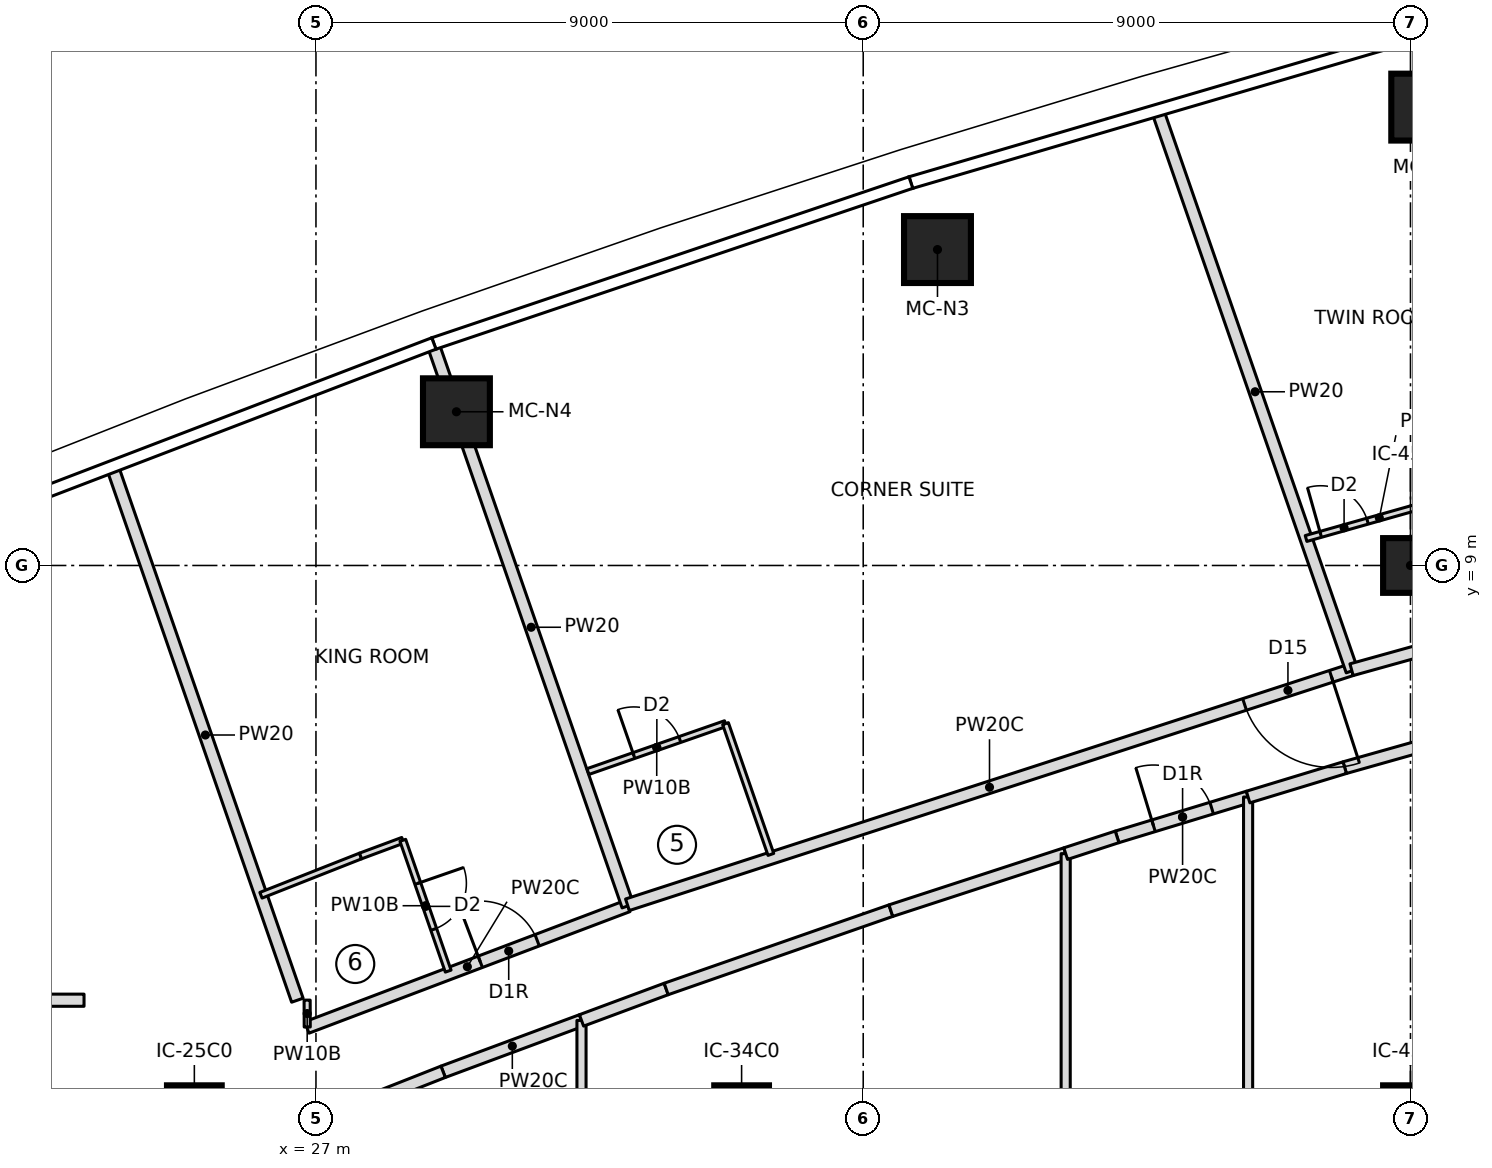
"""IFC4 building model, lengths in metres.
Left out: names, types, materials, properties, quantities, classifications, styles, units other than length and angle.
Written with IfcOpenShell. Run it as: python <this file> out.ifc"""

import sys

from ifc_helpers import new_model, si_unit, direction, frame, frame_2d, origin, origin_2d, place, context, subcontext, project, spatial, rectangle, extrude, element, fill, save


model = new_model("IFC4")
c1 = context("Model", 3, precision=1e-05, world=origin(), true_north=direction((0.0, 1.0)))
c2 = subcontext(c1, "Body", "Model", "MODEL_VIEW")
j1 = project(units=[si_unit("LENGTHUNIT", "METRE"), si_unit("PLANEANGLEUNIT", "RADIAN")], contexts=[c1])
p1 = place(None, origin())
s1 = spatial("IfcSite", under=j1, at=p1, CompositionType="ELEMENT")
p2 = place(p1, origin())
s2 = spatial("IfcBuilding", under=s1, at=p2, CompositionType="ELEMENT")
p3 = place(p2, frame((0.0, 0.0, 267.9)))
s3 = spatial("IfcBuildingStorey", under=s2, at=p3, CompositionType="ELEMENT", Elevation=267.9)
for number, where, z_axis, x_axis in (
    (1, (45.235, 16.539, 0.0), (0.0, 0.0, 1.0), (1.0, 0.0, 0.0)),
    (2, (37.221, 14.196, 0.0), (0.0, 0.0, 1.0), (1.0, 0.0, 0.0)),
    (3, (29.31, 11.528, 0.0), (0.0, 0.0, 1.0), (1.0, 0.0, 0.0)),
):
    element("IfcColumn", number, at=place(p3, frame(where, z_axis=z_axis, x_axis=x_axis)), inside=s3, PredefinedType="COLUMN", context=c2, shape_type="SweptSolid", body=[
        extrude(rectangle(XDim=1.1, YDim=1.1, at=origin_2d()), origin(), (0.0, 0.0, 1.0), 3.55),
    ])
for number, where, z_axis, x_axis in (
    (4, (25.0, 0.0, 0.0), (0.0, 0.0, 1.0), (1.0, 0.0, 0.0)),
    (5, (34.0, 0.0, 0.0), (0.0, 0.0, 1.0), (1.0, 0.0, 0.0)),
    (6, (45.0, 0.0, 0.0), (0.0, 0.0, 1.0), (1.0, 0.0, 0.0)),
    (7, (45.0, 9.0, 0.0), (0.0, 0.0, 1.0), (1.0, 0.0, 0.0)),
):
    element("IfcColumn", number, at=place(p3, frame(where, z_axis=z_axis, x_axis=x_axis)), inside=s3, PredefinedType="COLUMN", context=c2, shape_type="SweptSolid", body=[
        extrude(rectangle(XDim=0.9, YDim=0.9, at=origin_2d()), origin(), (0.0, 0.0, 1.0), 3.55),
    ])
p4 = place(p3, frame((7.287, 1.85, 0.0), z_axis=(0.0, 0.0, 1.0), x_axis=(1.0, 0.0, 0.0)))
e8 = element("IfcWall", 8, at=p4, inside=s3, PredefinedType="PARTITIONING", context=c2, shape_type="SweptSolid", body=[
    extrude(rectangle(XDim=15.899, YDim=0.2, at=frame_2d((7.949, 0.0))), origin(), (0.0, 0.0, 1.0), 3.25),
])
p5 = place(p4, frame((7.624, 0.0, 0.0)))
e9 = element("IfcOpeningElement", 9, at=p5, cuts=e8, PredefinedType="OPENING", context=c2, shape_type="SweptSolid", body=[
    extrude(rectangle(XDim=1.0, YDim=2.1, at=frame_2d((0.5, 1.05))), frame((0.0, 0.11, 0.0), z_axis=(0.0, -1.0, 0.0), x_axis=(1.0, 0.0, 0.0)), (0.0, 0.0, 1.0), 0.22),
])
p6 = place(p3, frame((26.694, 1.85, 0.0), z_axis=(0.0, 0.0, 1.0), x_axis=(-0.327714422317, 0.944776829418, 0.0)))
e10 = element("IfcWall", 10, at=p6, inside=s3, PredefinedType="PARTITIONING", context=c2, shape_type="SweptSolid", body=[
    extrude(rectangle(XDim=9.233, YDim=0.2, at=frame_2d((4.617, 0.0))), origin(), (0.0, 0.0, 1.0), 3.25),
])
p7 = place(p3, frame((26.85, 1.401, 0.0), z_axis=(0.0, 0.0, 1.0), x_axis=(0.935181367748, 0.354169181912, 0.0)))
e11 = element("IfcWall", 11, at=p7, inside=s3, PredefinedType="PARTITIONING", context=c2, shape_type="SweptSolid", body=[
    extrude(rectangle(XDim=5.645, YDim=0.2, at=frame_2d((2.823, 0.0))), origin(), (0.0, 0.0, 1.0), 3.25),
])
p8 = place(p7, frame((3.05, 0.0, 0.0)))
e12 = element("IfcOpeningElement", 12, at=p8, cuts=e11, PredefinedType="OPENING", context=c2, shape_type="SweptSolid", body=[
    extrude(rectangle(XDim=1.0, YDim=2.1, at=frame_2d((0.5, 1.05))), frame((0.0, 0.11, 0.0), z_axis=(0.0, -1.0, 0.0), x_axis=(1.0, 0.0, 0.0)), (0.0, 0.0, 1.0), 0.22),
])
p9 = place(p3, frame((26.096, 3.576, 0.0), z_axis=(0.0, 0.0, 1.0), x_axis=(0.930254925629, 0.366913850028, 0.0)))
e13 = element("IfcWall", 13, at=p9, inside=s3, PredefinedType="PARTITIONING", context=c2, shape_type="SweptSolid", body=[
    extrude(rectangle(XDim=1.76, YDim=0.1, at=frame_2d((0.88, 0.0))), origin(), (0.0, 0.0, 1.0), 3.25),
])
p10 = place(p3, frame((27.733, 4.222, 0.0), z_axis=(0.0, 0.0, 1.0), x_axis=(0.937514267289, 0.347946833049, 0.0)))
e14 = element("IfcWall", 14, at=p10, inside=s3, PredefinedType="PARTITIONING", context=c2, shape_type="SweptSolid", body=[
    extrude(rectangle(XDim=0.742, YDim=0.1, at=frame_2d((0.371, 0.0))), origin(), (0.0, 0.0, 1.0), 3.25),
])
p11 = place(p3, frame((28.428, 4.48, 0.0), z_axis=(0.0, 0.0, 1.0), x_axis=(0.327718024288, -0.944775579996, 0.0)))
e15 = element("IfcWall", 15, at=p11, inside=s3, PredefinedType="PARTITIONING", context=c2, shape_type="SweptSolid", body=[
    extrude(rectangle(XDim=2.277, YDim=0.1, at=frame_2d((1.139, 0.0))), origin(), (0.0, 0.0, 1.0), 3.25),
])
p12 = place(p11, frame((0.75, 0.0, 0.0)))
e16 = element("IfcOpeningElement", 16, at=p12, cuts=e15, PredefinedType="OPENING", context=c2, shape_type="SweptSolid", body=[
    extrude(rectangle(XDim=0.8, YDim=2.1, at=frame_2d((0.4, 1.05))), frame((0.0, 0.06, 0.0), z_axis=(0.0, -1.0, 0.0), x_axis=(1.0, 0.0, 0.0)), (0.0, 0.0, 1.0), 0.12),
])
p13 = place(p3, frame((32.129, 3.401, 0.0), z_axis=(0.0, 0.0, 1.0), x_axis=(-0.327724115377, 0.944773467134, 0.0)))
e17 = element("IfcWall", 17, at=p13, inside=s3, PredefinedType="PARTITIONING", context=c2, shape_type="SweptSolid", body=[
    extrude(rectangle(XDim=9.702, YDim=0.2, at=frame_2d((4.851, 0.0))), origin(), (0.0, 0.0, 1.0), 3.25),
])
p14 = place(p3, frame((44.031, 7.286, 0.0), z_axis=(0.0, 0.0, 1.0), x_axis=(-0.951130603276, -0.308788885019, 0.0)))
e18 = element("IfcWall", 18, at=p14, inside=s3, PredefinedType="PARTITIONING", context=c2, shape_type="SweptSolid", body=[
    extrude(rectangle(XDim=12.521, YDim=0.2, at=frame_2d((6.26, 0.0))), origin(), (0.0, 0.0, 1.0), 3.25),
])
p15 = place(p14, frame((0.35, 0.0, 0.0)))
e19 = element("IfcOpeningElement", 19, at=p15, cuts=e18, PredefinedType="OPENING", context=c2, shape_type="SweptSolid", body=[
    extrude(rectangle(XDim=1.5, YDim=2.1, at=frame_2d((0.75, 1.05))), frame((0.0, 0.11, 0.0), z_axis=(0.0, -1.0, 0.0), x_axis=(1.0, 0.0, 0.0)), (0.0, 0.0, 1.0), 0.22),
])
p16 = place(p3, frame((31.473, 5.611, 0.0), z_axis=(0.0, 0.0, 1.0), x_axis=(0.944305532659, 0.329069994059, 0.0)))
e20 = element("IfcWall", 20, at=p16, inside=s3, PredefinedType="PARTITIONING", context=c2, shape_type="SweptSolid", body=[
    extrude(rectangle(XDim=2.396, YDim=0.1, at=frame_2d((1.198, 0.0))), origin(), (0.0, 0.0, 1.0), 3.25),
])
p17 = place(p16, frame((0.8, 0.0, 0.0)))
e21 = element("IfcOpeningElement", 21, at=p17, cuts=e20, PredefinedType="OPENING", context=c2, shape_type="SweptSolid", body=[
    extrude(rectangle(XDim=0.8, YDim=2.1, at=frame_2d((0.4, 1.05))), frame((0.0, 0.06, 0.0), z_axis=(0.0, -1.0, 0.0), x_axis=(1.0, 0.0, 0.0)), (0.0, 0.0, 1.0), 0.12),
])
p18 = place(p3, frame((33.735, 6.399, 0.0), z_axis=(0.0, 0.0, 1.0), x_axis=(0.32768871219, -0.944785747089, 0.0)))
e22 = element("IfcWall", 22, at=p18, inside=s3, PredefinedType="PARTITIONING", context=c2, shape_type="SweptSolid", body=[
    extrude(rectangle(XDim=2.277, YDim=0.1, at=frame_2d((1.138, 0.0))), origin(), (0.0, 0.0, 1.0), 3.25),
])
p19 = place(p3, frame((44.038, 7.267, 0.0), z_axis=(0.0, 0.0, 1.0), x_axis=(-0.327714576096, 0.944776776077, 0.0)))
e23 = element("IfcWall", 23, at=p19, inside=s3, PredefinedType="PARTITIONING", context=c2, shape_type="SweptSolid", body=[
    extrude(rectangle(XDim=9.717, YDim=0.2, at=frame_2d((4.858, 0.0))), origin(), (0.0, 0.0, 1.0), 3.25),
])
p20 = place(p3, frame((48.056, 8.405, 0.0), z_axis=(0.0, 0.0, 1.0), x_axis=(-0.963429942227, -0.267960344866, 0.0)))
e24 = element("IfcWall", 24, at=p20, inside=s3, PredefinedType="PARTITIONING", context=c2, shape_type="SweptSolid", body=[
    extrude(rectangle(XDim=4.177, YDim=0.2, at=frame_2d((2.089, 0.0))), origin(), (0.0, 0.0, 1.0), 3.25),
])
p21 = place(p20, frame((0.35, 0.0, 0.0)))
e25 = element("IfcOpeningElement", 25, at=p21, cuts=e24, PredefinedType="OPENING", context=c2, shape_type="SweptSolid", body=[
    extrude(rectangle(XDim=1.0, YDim=2.1, at=frame_2d((0.5, 1.05))), frame((0.0, 0.11, 0.0), z_axis=(0.0, -1.0, 0.0), x_axis=(1.0, 0.0, 0.0)), (0.0, 0.0, 1.0), 0.22),
])
p22 = place(p3, frame((43.283, 9.444, 0.0), z_axis=(0.0, 0.0, 1.0), x_axis=(0.962409173596, 0.271603723424, 0.0)))
e26 = element("IfcWall", 26, at=p22, inside=s3, PredefinedType="PARTITIONING", context=c2, shape_type="SweptSolid", body=[
    extrude(rectangle(XDim=2.504, YDim=0.1, at=frame_2d((1.252, 0.0))), origin(), (0.0, 0.0, 1.0), 3.25),
])
p23 = place(p22, frame((0.25, 0.0, 0.0)))
e27 = element("IfcOpeningElement", 27, at=p23, cuts=e26, PredefinedType="OPENING", context=c2, shape_type="SweptSolid", body=[
    extrude(rectangle(XDim=0.8, YDim=2.1, at=frame_2d((0.4, 1.05))), frame((0.0, 0.06, 0.0), z_axis=(0.0, -1.0, 0.0), x_axis=(1.0, 0.0, 0.0)), (0.0, 0.0, 1.0), 0.12),
])
p24 = place(p3, frame((29.092, 0.673, 0.0), z_axis=(0.0, 0.0, 1.0), x_axis=(0.937481542944, 0.348034993411, 0.0)))
e28 = element("IfcWall", 28, at=p24, inside=s3, PredefinedType="PARTITIONING", context=c2, shape_type="SweptSolid", body=[
    extrude(rectangle(XDim=2.427, YDim=0.2, at=frame_2d((1.214, 0.0))), origin(), (0.0, 0.0, 1.0), 3.25),
])
p25 = place(p3, frame((27.385, 0.0, 0.0), z_axis=(0.0, 0.0, 1.0), x_axis=(0.930265251482, 0.366887669302, 0.0)))
e29 = element("IfcWall", 29, at=p25, inside=s3, PredefinedType="PARTITIONING", context=c2, shape_type="SweptSolid", body=[
    extrude(rectangle(XDim=1.834, YDim=0.2, at=frame_2d((0.917, 0.0))), origin(), (0.0, 0.0, 1.0), 3.25),
])
p26 = place(p3, frame((31.367, -1.518, 0.0), z_axis=(0.0, 0.0, 1.0), x_axis=(0.0, 1.0, 0.0)))
e30 = element("IfcWall", 30, at=p26, inside=s3, PredefinedType="PARTITIONING", context=c2, shape_type="SweptSolid", body=[
    extrude(rectangle(XDim=3.035, YDim=0.15, at=frame_2d((1.518, 0.0))), origin(), (0.0, 0.0, 1.0), 3.25),
])
p27 = place(p3, frame((31.367, 1.518, 0.0), z_axis=(0.0, 0.0, 1.0), x_axis=(0.93742527201, 0.348186529604, 0.0)))
e31 = element("IfcWall", 31, at=p27, inside=s3, PredefinedType="PARTITIONING", context=c2, shape_type="SweptSolid", body=[
    extrude(rectangle(XDim=1.486, YDim=0.2, at=frame_2d((0.743, 0.0))), origin(), (0.0, 0.0, 1.0), 3.25),
])
p28 = place(p3, frame((32.76, 2.035, 0.0), z_axis=(0.0, 0.0, 1.0), x_axis=(0.944283635062, 0.329132825093, 0.0)))
e32 = element("IfcWall", 32, at=p28, inside=s3, PredefinedType="PARTITIONING", context=c2, shape_type="SweptSolid", body=[
    extrude(rectangle(XDim=3.913, YDim=0.2, at=frame_2d((1.957, 0.0))), origin(), (0.0, 0.0, 1.0), 3.25),
])
p29 = place(p3, frame((36.455, 3.323, 0.0), z_axis=(0.0, 0.0, 1.0), x_axis=(0.95070604111, 0.310093572003, 0.0)))
e33 = element("IfcWall", 33, at=p29, inside=s3, PredefinedType="PARTITIONING", context=c2, shape_type="SweptSolid", body=[
    extrude(rectangle(XDim=3.024, YDim=0.2, at=frame_2d((1.512, 0.0))), origin(), (0.0, 0.0, 1.0), 3.25),
])
p30 = place(p3, frame((39.33, -4.26, 0.0), z_axis=(0.0, 0.0, 1.0), x_axis=(0.0, 1.0, 0.0)))
e34 = element("IfcWall", 34, at=p30, inside=s3, PredefinedType="PARTITIONING", context=c2, shape_type="SweptSolid", body=[
    extrude(rectangle(XDim=8.521, YDim=0.15, at=frame_2d((4.26, 0.0))), origin(), (0.0, 0.0, 1.0), 3.25),
])
p31 = place(p3, frame((40.175, 4.536, 0.0), z_axis=(0.0, 0.0, 1.0), x_axis=(0.956739496331, 0.290945933396, 0.0)))
e35 = element("IfcWall", 35, at=p31, inside=s3, PredefinedType="PARTITIONING", context=c2, shape_type="SweptSolid", body=[
    extrude(rectangle(XDim=2.252, YDim=0.2, at=frame_2d((1.126, 0.0))), origin(), (0.0, 0.0, 1.0), 3.25),
])
p32 = place(p31, frame((0.626, 0.0, 0.0)))
e36 = element("IfcOpeningElement", 36, at=p32, cuts=e35, PredefinedType="OPENING", context=c2, shape_type="SweptSolid", body=[
    extrude(rectangle(XDim=1.0, YDim=2.1, at=frame_2d((0.5, 1.05))), frame((0.0, 0.11, 0.0), z_axis=(0.0, -1.0, 0.0), x_axis=(1.0, 0.0, 0.0)), (0.0, 0.0, 1.0), 0.22),
])
p33 = place(p3, frame((39.33, 4.26, 0.0), z_axis=(0.0, 0.0, 1.0), x_axis=(0.950722800792, 0.310042184314, 0.0)))
e37 = element("IfcWall", 37, at=p33, inside=s3, PredefinedType="PARTITIONING", context=c2, shape_type="SweptSolid", body=[
    extrude(rectangle(XDim=0.889, YDim=0.2, at=frame_2d((0.444, 0.0))), origin(), (0.0, 0.0, 1.0), 3.25),
])
p34 = place(p3, frame((42.33, -5.191, 0.0), z_axis=(0.0, 0.0, 1.0), x_axis=(0.0, 1.0, 0.0)))
e38 = element("IfcWall", 38, at=p34, inside=s3, PredefinedType="PARTITIONING", context=c2, shape_type="SweptSolid", body=[
    extrude(rectangle(XDim=10.383, YDim=0.15, at=frame_2d((5.191, 0.0))), origin(), (0.0, 0.0, 1.0), 3.25),
])
p35 = place(p3, frame((43.918, 5.675, 0.0), z_axis=(0.0, 0.0, 1.0), x_axis=(0.962411212211, 0.271596499628, 0.0)))
e39 = element("IfcWall", 39, at=p35, inside=s3, PredefinedType="PARTITIONING", context=c2, shape_type="SweptSolid", body=[
    extrude(rectangle(XDim=3.913, YDim=0.2, at=frame_2d((1.957, 0.0))), origin(), (0.0, 0.0, 1.0), 3.25),
])
p36 = place(p35, frame((1.457, 0.0, 0.0)))
e40 = element("IfcOpeningElement", 40, at=p36, cuts=e39, PredefinedType="OPENING", context=c2, shape_type="SweptSolid", body=[
    extrude(rectangle(XDim=1.0, YDim=2.1, at=frame_2d((0.5, 1.05))), frame((0.0, 0.11, 0.0), z_axis=(0.0, -1.0, 0.0), x_axis=(1.0, 0.0, 0.0)), (0.0, 0.0, 1.0), 0.22),
])
p37 = place(p3, frame((42.33, 5.191, 0.0), z_axis=(0.0, 0.0, 1.0), x_axis=(0.956702361065, 0.291068020115, 0.0)))
e41 = element("IfcWall", 41, at=p37, inside=s3, PredefinedType="PARTITIONING", context=c2, shape_type="SweptSolid", body=[
    extrude(rectangle(XDim=1.661, YDim=0.2, at=frame_2d((0.831, 0.0))), origin(), (0.0, 0.0, 1.0), 3.25),
])
p38 = place(p3, frame((26.856, 1.409, 0.0), z_axis=(0.0, 0.0, 1.0), x_axis=(-0.003863105832, 0.999992538179, 0.0)))
e42 = element("IfcWall", 42, at=p38, inside=s3, PredefinedType="PARTITIONING", context=c2, shape_type="SweptSolid", body=[
    extrude(rectangle(XDim=0.442, YDim=0.1, at=frame_2d((0.221, 0.0))), origin(), (0.0, 0.0, 1.0), 3.25),
])
p39 = place(p12, origin())
e43 = element("IfcDoor", 43, at=p39, inside=s3, OperationType="SINGLE_SWING_LEFT", PredefinedType="DOOR", context=c2, shape_type="SweptSolid", body=[
    extrude(rectangle(XDim=0.8, YDim=2.1, at=frame_2d((0.4, 1.05))), frame((0.0, 0.025, 0.0), z_axis=(0.0, -1.0, 0.0), x_axis=(1.0, 0.0, 0.0)), (0.0, 0.0, 1.0), 0.05),
])
fill(e16, e43)
p40 = place(p8, origin())
e44 = element("IfcDoor", 44, at=p40, inside=s3, OperationType="SINGLE_SWING_RIGHT", PredefinedType="DOOR", context=c2, shape_type="SweptSolid", body=[
    extrude(rectangle(XDim=1.0, YDim=2.1, at=frame_2d((0.5, 1.05))), frame((0.0, 0.025, 0.0), z_axis=(0.0, -1.0, 0.0), x_axis=(1.0, 0.0, 0.0)), (0.0, 0.0, 1.0), 0.05),
])
fill(e12, e44)
p41 = place(p17, origin())
e45 = element("IfcDoor", 45, at=p41, inside=s3, OperationType="SINGLE_SWING_LEFT", PredefinedType="DOOR", context=c2, shape_type="SweptSolid", body=[
    extrude(rectangle(XDim=0.8, YDim=2.1, at=frame_2d((0.4, 1.05))), frame((0.0, 0.025, 0.0), z_axis=(0.0, -1.0, 0.0), x_axis=(1.0, 0.0, 0.0)), (0.0, 0.0, 1.0), 0.05),
])
fill(e21, e45)
p42 = place(p15, origin())
e46 = element("IfcDoor", 46, at=p42, inside=s3, OperationType="DOUBLE_DOOR_SINGLE_SWING", PredefinedType="DOOR", context=c2, shape_type="SweptSolid", body=[
    extrude(rectangle(XDim=1.5, YDim=2.1, at=frame_2d((0.75, 1.05))), frame((0.0, 0.025, 0.0), z_axis=(0.0, -1.0, 0.0), x_axis=(1.0, 0.0, 0.0)), (0.0, 0.0, 1.0), 0.05),
])
fill(e19, e46)
p43 = place(p23, origin())
e47 = element("IfcDoor", 47, at=p43, inside=s3, OperationType="SINGLE_SWING_LEFT", PredefinedType="DOOR", context=c2, shape_type="SweptSolid", body=[
    extrude(rectangle(XDim=0.8, YDim=2.1, at=frame_2d((0.4, 1.05))), frame((0.0, 0.025, 0.0), z_axis=(0.0, -1.0, 0.0), x_axis=(1.0, 0.0, 0.0)), (0.0, 0.0, 1.0), 0.05),
])
fill(e27, e47)
p44 = place(p32, origin())
e48 = element("IfcDoor", 48, at=p44, inside=s3, OperationType="SINGLE_SWING_RIGHT", PredefinedType="DOOR", context=c2, shape_type="SweptSolid", body=[
    extrude(rectangle(XDim=1.0, YDim=2.1, at=frame_2d((0.5, 1.05))), frame((0.0, 0.025, 0.0), z_axis=(0.0, -1.0, 0.0), x_axis=(1.0, 0.0, 0.0)), (0.0, 0.0, 1.0), 0.05),
])
fill(e36, e48)
save(model, sys.argv[1])
